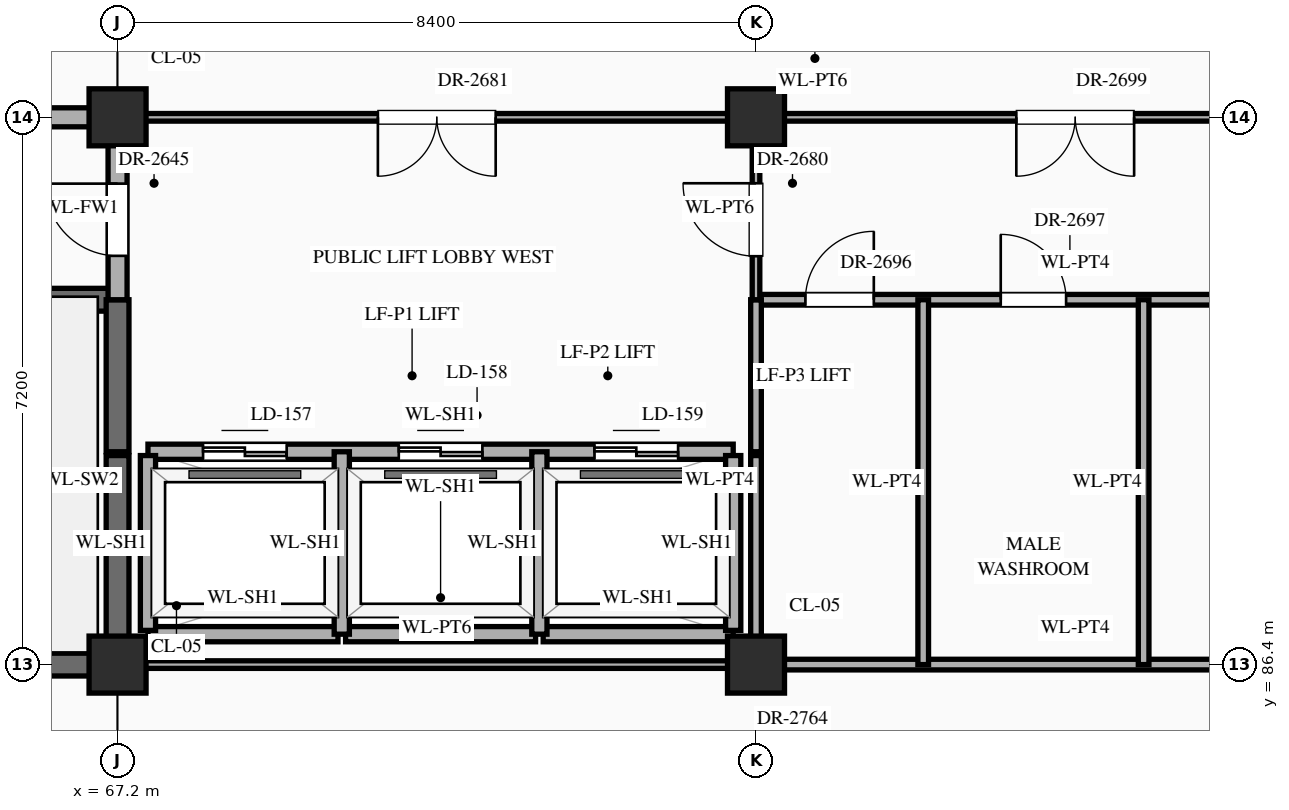
"""IFC4 building model, lengths in metres.
Left out: names, types, materials, properties, quantities, classifications, styles, units other than length and angle.
Written with IfcOpenShell. Run it as: python <this file> out.ifc"""

import sys

from ifc_helpers import new_model, si_unit, direction, frame, frame_2d, origin, origin_2d, place, context, subcontext, project, spatial, rectangle, extrude, element, fill, save


model = new_model("IFC4")
c1 = context("Model", 3, precision=1e-05, world=origin(), true_north=direction((0.0, 1.0)))
c2 = subcontext(c1, "Body", "Model", "MODEL_VIEW")
j1 = project(units=[si_unit("LENGTHUNIT", "METRE"), si_unit("PLANEANGLEUNIT", "RADIAN")], contexts=[c1])
p1 = place(None, origin())
s1 = spatial("IfcSite", under=j1, at=p1, CompositionType="ELEMENT")
p2 = place(p1, origin())
s2 = spatial("IfcBuilding", under=s1, at=p2, CompositionType="ELEMENT")
p3 = place(p2, frame((0.0, 0.0, 39.3)))
s3 = spatial("IfcBuildingStorey", under=s2, at=p3, CompositionType="ELEMENT", Elevation=39.3)
for number, where, z_axis, x_axis in (
    (1, (67.2, 86.4, 0.0), (0.0, 0.0, 1.0), (1.0, 0.0, 0.0)),
    (2, (67.2, 93.6, 0.0), (0.0, 0.0, 1.0), (1.0, 0.0, 0.0)),
    (3, (75.6, 86.4, 0.0), (0.0, 0.0, 1.0), (1.0, 0.0, 0.0)),
    (4, (75.6, 93.6, 0.0), (0.0, 0.0, 1.0), (1.0, 0.0, 0.0)),
):
    element("IfcColumn", number, at=place(p3, frame(where, z_axis=z_axis, x_axis=x_axis)), inside=s3, PredefinedType="COLUMN", context=c2, shape_type="SweptSolid", body=[
        extrude(rectangle(XDim=0.75, YDim=0.75, at=origin_2d()), origin(), (0.0, 0.0, 1.0), 4.2),
    ])
p4 = place(p3, frame((58.8, 86.4, 0.0), z_axis=(0.0, 0.0, 1.0), x_axis=(1.0, 0.0, 0.0)))
e5 = element("IfcWall", 5, at=p4, inside=s3, PredefinedType="SHEAR", context=c2, shape_type="SweptSolid", body=[
    extrude(rectangle(XDim=8.4, YDim=0.3, at=frame_2d((4.2, 0.0))), origin(), (0.0, 0.0, 1.0), 3.95),
])
p5 = place(p3, frame((67.25, 86.4, 0.0), z_axis=(0.0, 0.0, 1.0), x_axis=(1.0, 0.0, 0.0)))
e6 = element("IfcWall", 6, at=p5, inside=s3, PredefinedType="STANDARD", context=c2, shape_type="SweptSolid", body=[
    extrude(rectangle(XDim=8.3, YDim=0.1, at=frame_2d((4.15, 0.0))), origin(), (0.0, 0.0, 1.0), 3.1),
])
p6 = place(p3, frame((75.6, 86.4, 0.0), z_axis=(0.0, 0.0, 1.0), x_axis=(1.0, 0.0, 0.0)))
e7 = element("IfcWall", 7, at=p6, inside=s3, PredefinedType="STANDARD", context=c2, shape_type="SweptSolid", body=[
    extrude(rectangle(XDim=8.4, YDim=0.14, at=frame_2d((4.2, 0.0))), origin(), (0.0, 0.0, 1.0), 3.1),
])
for number, where, z_axis, x_axis in (
    (8, (67.6, 86.8, 0.0), (0.0, 0.0, 1.0), (1.0, 0.0, 0.0)),
    (9, (70.2, 86.8, 0.0), (0.0, 0.0, 1.0), (1.0, 0.0, 0.0)),
    (10, (72.8, 86.8, 0.0), (0.0, 0.0, 1.0), (1.0, 0.0, 0.0)),
):
    element("IfcWall", number, at=place(p3, frame(where, z_axis=z_axis, x_axis=x_axis)), inside=s3, PredefinedType="STANDARD", context=c2, shape_type="SweptSolid", body=[
        extrude(rectangle(XDim=2.5, YDim=0.2, at=frame_2d((1.25, 0.0))), origin(), (0.0, 0.0, 1.0), 3.95),
    ])
p7 = place(p3, frame((67.6, 89.2, 0.0), z_axis=(0.0, 0.0, 1.0), x_axis=(1.0, 0.0, 0.0)))
e11 = element("IfcWall", 11, at=p7, inside=s3, PredefinedType="STANDARD", context=c2, shape_type="SweptSolid", body=[
    extrude(rectangle(XDim=7.7, YDim=0.2, at=frame_2d((3.85, 0.0))), origin(), (0.0, 0.0, 1.0), 3.95),
])
p8 = place(p7, frame((0.725, 0.0, 0.0)))
e12 = element("IfcOpeningElement", 12, at=p8, cuts=e11, PredefinedType="OPENING", context=c2, shape_type="SweptSolid", body=[
    extrude(rectangle(XDim=1.1, YDim=2.15, at=frame_2d((0.55, 1.075))), frame((0.0, 0.112, 0.0), z_axis=(0.0, -1.0, 0.0), x_axis=(1.0, 0.0, 0.0)), (0.0, 0.0, 1.0), 0.224),
])
p9 = place(p7, frame((3.3, 0.0, 0.0)))
e13 = element("IfcOpeningElement", 13, at=p9, cuts=e11, PredefinedType="OPENING", context=c2, shape_type="SweptSolid", body=[
    extrude(rectangle(XDim=1.1, YDim=2.15, at=frame_2d((0.55, 1.075))), frame((0.0, 0.112, 0.0), z_axis=(0.0, -1.0, 0.0), x_axis=(1.0, 0.0, 0.0)), (0.0, 0.0, 1.0), 0.224),
])
p10 = place(p7, frame((5.875, 0.0, 0.0)))
e14 = element("IfcOpeningElement", 14, at=p10, cuts=e11, PredefinedType="OPENING", context=c2, shape_type="SweptSolid", body=[
    extrude(rectangle(XDim=1.1, YDim=2.15, at=frame_2d((0.55, 1.075))), frame((0.0, 0.112, 0.0), z_axis=(0.0, -1.0, 0.0), x_axis=(1.0, 0.0, 0.0)), (0.0, 0.0, 1.0), 0.224),
])
p11 = place(p3, frame((58.8, 91.2, 0.0), z_axis=(0.0, 0.0, 1.0), x_axis=(1.0, 0.0, 0.0)))
e15 = element("IfcWall", 15, at=p11, inside=s3, PredefinedType="SHEAR", context=c2, shape_type="SweptSolid", body=[
    extrude(rectangle(XDim=8.4, YDim=0.3, at=frame_2d((4.2, 0.0))), origin(), (0.0, 0.0, 1.0), 3.95),
])
p12 = place(p11, frame((0.65, 0.0, 0.0)))
e16 = element("IfcOpeningElement", 16, at=p12, cuts=e15, PredefinedType="OPENING", context=c2, shape_type="SweptSolid", body=[
    extrude(rectangle(XDim=1.1, YDim=2.2, at=frame_2d((0.55, 1.1))), frame((0.0, 0.162, 0.0), z_axis=(0.0, -1.0, 0.0), x_axis=(1.0, 0.0, 0.0)), (0.0, 0.0, 1.0), 0.324),
])
p13 = place(p3, frame((75.6, 91.2, 0.0), z_axis=(0.0, 0.0, 1.0), x_axis=(1.0, 0.0, 0.0)))
e17 = element("IfcWall", 17, at=p13, inside=s3, PredefinedType="STANDARD", context=c2, shape_type="SweptSolid", body=[
    extrude(rectangle(XDim=8.4, YDim=0.14, at=frame_2d((4.2, 0.0))), origin(), (0.0, 0.0, 1.0), 3.95),
])
p14 = place(p13, frame((0.65, 0.0, 0.0)))
e18 = element("IfcOpeningElement", 18, at=p14, cuts=e17, PredefinedType="OPENING", context=c2, shape_type="SweptSolid", body=[
    extrude(rectangle(XDim=0.9, YDim=2.15, at=frame_2d((0.45, 1.075))), frame((0.0, 0.082, 0.0), z_axis=(0.0, -1.0, 0.0), x_axis=(1.0, 0.0, 0.0)), (0.0, 0.0, 1.0), 0.164),
])
p15 = place(p13, frame((3.22, 0.0, 0.0)))
e19 = element("IfcOpeningElement", 19, at=p15, cuts=e17, PredefinedType="OPENING", context=c2, shape_type="SweptSolid", body=[
    extrude(rectangle(XDim=0.86, YDim=2.1, at=frame_2d((0.43, 1.05))), frame((0.0, 0.082, 0.0), z_axis=(0.0, -1.0, 0.0), x_axis=(1.0, 0.0, 0.0)), (0.0, 0.0, 1.0), 0.164),
])
p16 = place(p13, frame((6.32, 0.0, 0.0)))
e20 = element("IfcOpeningElement", 20, at=p16, cuts=e17, PredefinedType="OPENING", context=c2, shape_type="SweptSolid", body=[
    extrude(rectangle(XDim=0.86, YDim=2.1, at=frame_2d((0.43, 1.05))), frame((0.0, 0.082, 0.0), z_axis=(0.0, -1.0, 0.0), x_axis=(1.0, 0.0, 0.0)), (0.0, 0.0, 1.0), 0.164),
])
p17 = place(p3, frame((58.8, 93.6, 0.0), z_axis=(0.0, 0.0, 1.0), x_axis=(1.0, 0.0, 0.0)))
e21 = element("IfcWall", 21, at=p17, inside=s3, PredefinedType="STANDARD", context=c2, shape_type="SweptSolid", body=[
    extrude(rectangle(XDim=8.4, YDim=0.25, at=frame_2d((4.2, 0.0))), origin(), (0.0, 0.0, 1.0), 3.1),
])
p18 = place(p17, frame((3.2, 0.0, 0.0)))
e22 = element("IfcOpeningElement", 22, at=p18, cuts=e21, PredefinedType="OPENING", context=c2, shape_type="SweptSolid", body=[
    extrude(rectangle(XDim=2.0, YDim=2.4, at=frame_2d((1.0, 1.2))), frame((0.0, 0.137, 0.0), z_axis=(0.0, -1.0, 0.0), x_axis=(1.0, 0.0, 0.0)), (0.0, 0.0, 1.0), 0.274),
])
p19 = place(p3, frame((67.2, 93.6, 0.0), z_axis=(0.0, 0.0, 1.0), x_axis=(1.0, 0.0, 0.0)))
e23 = element("IfcWall", 23, at=p19, inside=s3, PredefinedType="STANDARD", context=c2, shape_type="SweptSolid", body=[
    extrude(rectangle(XDim=33.6, YDim=0.1, at=frame_2d((16.8, 0.0))), origin(), (0.0, 0.0, 1.0), 3.1),
])
p20 = place(p19, frame((3.425, 0.0, 0.0)))
e24 = element("IfcOpeningElement", 24, at=p20, cuts=e23, PredefinedType="OPENING", context=c2, shape_type="SweptSolid", body=[
    extrude(rectangle(XDim=1.55, YDim=2.35, at=frame_2d((0.775, 1.175))), frame((0.0, 0.062, 0.0), z_axis=(0.0, -1.0, 0.0), x_axis=(1.0, 0.0, 0.0)), (0.0, 0.0, 1.0), 0.124),
])
p21 = place(p19, frame((28.55, 0.0, 0.0)))
e25 = element("IfcOpeningElement", 25, at=p21, cuts=e23, PredefinedType="OPENING", context=c2, shape_type="SweptSolid", body=[
    extrude(rectangle(XDim=1.7, YDim=2.45, at=frame_2d((0.85, 1.225))), frame((0.0, 0.062, 0.0), z_axis=(0.0, -1.0, 0.0), x_axis=(1.0, 0.0, 0.0)), (0.0, 0.0, 1.0), 0.124),
])
p22 = place(p19, frame((11.825, 0.0, 0.0)))
e26 = element("IfcOpeningElement", 26, at=p22, cuts=e23, PredefinedType="OPENING", context=c2, shape_type="SweptSolid", body=[
    extrude(rectangle(XDim=1.55, YDim=2.35, at=frame_2d((0.775, 1.175))), frame((0.0, 0.062, 0.0), z_axis=(0.0, -1.0, 0.0), x_axis=(1.0, 0.0, 0.0)), (0.0, 0.0, 1.0), 0.124),
])
p23 = place(p19, frame((17.708, 0.0, 0.0)))
e27 = element("IfcOpeningElement", 27, at=p23, cuts=e23, PredefinedType="OPENING", context=c2, shape_type="SweptSolid", body=[
    extrude(rectangle(XDim=1.28, YDim=2.35, at=frame_2d((0.64, 1.175))), frame((0.0, 0.062, 0.0), z_axis=(0.0, -1.0, 0.0), x_axis=(1.0, 0.0, 0.0)), (0.0, 0.0, 1.0), 0.124),
])
p24 = place(p19, frame((20.53, 0.0, 0.0)))
e28 = element("IfcOpeningElement", 28, at=p24, cuts=e23, PredefinedType="OPENING", context=c2, shape_type="SweptSolid", body=[
    extrude(rectangle(XDim=0.94, YDim=2.3, at=frame_2d((0.47, 1.15))), frame((0.0, 0.062, 0.0), z_axis=(0.0, -1.0, 0.0), x_axis=(1.0, 0.0, 0.0)), (0.0, 0.0, 1.0), 0.124),
])
p25 = place(p19, frame((23.163, 0.0, 0.0)))
e29 = element("IfcOpeningElement", 29, at=p25, cuts=e23, PredefinedType="OPENING", context=c2, shape_type="SweptSolid", body=[
    extrude(rectangle(XDim=0.98, YDim=2.35, at=frame_2d((0.49, 1.175))), frame((0.0, 0.062, 0.0), z_axis=(0.0, -1.0, 0.0), x_axis=(1.0, 0.0, 0.0)), (0.0, 0.0, 1.0), 0.124),
])
p26 = place(p3, frame((67.2, 86.45, 0.0), z_axis=(0.0, 0.0, 1.0), x_axis=(0.0, 1.0, 0.0)))
e30 = element("IfcWall", 30, at=p26, inside=s3, PredefinedType="SHEAR", context=c2, shape_type="SweptSolid", body=[
    extrude(rectangle(XDim=2.7, YDim=0.3, at=frame_2d((1.35, 0.0))), origin(), (0.0, 0.0, 1.0), 3.95),
])
p27 = place(p3, frame((67.2, 89.2, 0.0), z_axis=(0.0, 0.0, 1.0), x_axis=(0.0, 1.0, 0.0)))
e31 = element("IfcWall", 31, at=p27, inside=s3, PredefinedType="SHEAR", context=c2, shape_type="SweptSolid", body=[
    extrude(rectangle(XDim=2.0, YDim=0.3, at=frame_2d((1.0, 0.0))), origin(), (0.0, 0.0, 1.0), 3.95),
])
p28 = place(p3, frame((67.2, 91.2, 0.0), z_axis=(0.0, 0.0, 1.0), x_axis=(0.0, 1.0, 0.0)))
e32 = element("IfcWall", 32, at=p28, inside=s3, PredefinedType="STANDARD", context=c2, shape_type="SweptSolid", body=[
    extrude(rectangle(XDim=2.4, YDim=0.25, at=frame_2d((1.2, 0.0))), origin(), (0.0, 0.0, 1.0), 3.2),
])
p29 = place(p28, frame((0.577, 0.0, 0.0)))
e33 = element("IfcOpeningElement", 33, at=p29, cuts=e32, PredefinedType="OPENING", context=c2, shape_type="SweptSolid", body=[
    extrude(rectangle(XDim=0.95, YDim=2.15, at=frame_2d((0.475, 1.075))), frame((0.0, 0.137, 0.0), z_axis=(0.0, -1.0, 0.0), x_axis=(1.0, 0.0, 0.0)), (0.0, 0.0, 1.0), 0.274),
])
p30 = place(p3, frame((67.6, 86.85, 0.0), z_axis=(0.0, 0.0, 1.0), x_axis=(0.0, 1.0, 0.0)))
e34 = element("IfcWall", 34, at=p30, inside=s3, PredefinedType="STANDARD", context=c2, shape_type="SweptSolid", body=[
    extrude(rectangle(XDim=2.3, YDim=0.2, at=frame_2d((1.15, 0.0))), origin(), (0.0, 0.0, 1.0), 3.95),
])
for number, where, z_axis, x_axis in (
    (35, (70.15, 86.8, 0.0), (0.0, 0.0, 1.0), (0.0, 1.0, 0.0)),
    (36, (72.75, 86.8, 0.0), (0.0, 0.0, 1.0), (0.0, 1.0, 0.0)),
):
    element("IfcWall", number, at=place(p3, frame(where, z_axis=z_axis, x_axis=x_axis)), inside=s3, PredefinedType="STANDARD", context=c2, shape_type="SweptSolid", body=[
        extrude(rectangle(XDim=2.4, YDim=0.2, at=frame_2d((1.2, 0.0))), origin(), (0.0, 0.0, 1.0), 3.95),
    ])
p31 = place(p3, frame((75.3, 86.85, 0.0), z_axis=(0.0, 0.0, 1.0), x_axis=(0.0, 1.0, 0.0)))
e37 = element("IfcWall", 37, at=p31, inside=s3, PredefinedType="STANDARD", context=c2, shape_type="SweptSolid", body=[
    extrude(rectangle(XDim=2.3, YDim=0.2, at=frame_2d((1.15, 0.0))), origin(), (0.0, 0.0, 1.0), 3.95),
])
p32 = place(p3, frame((75.6, 86.45, 0.0), z_axis=(0.0, 0.0, 1.0), x_axis=(0.0, 1.0, 0.0)))
e38 = element("IfcWall", 38, at=p32, inside=s3, PredefinedType="STANDARD", context=c2, shape_type="SweptSolid", body=[
    extrude(rectangle(XDim=2.7, YDim=0.14, at=frame_2d((1.35, 0.0))), origin(), (0.0, 0.0, 1.0), 3.2),
])
p33 = place(p3, frame((75.6, 89.2, 0.0), z_axis=(0.0, 0.0, 1.0), x_axis=(0.0, 1.0, 0.0)))
e39 = element("IfcWall", 39, at=p33, inside=s3, PredefinedType="STANDARD", context=c2, shape_type="SweptSolid", body=[
    extrude(rectangle(XDim=2.0, YDim=0.14, at=frame_2d((1.0, 0.0))), origin(), (0.0, 0.0, 1.0), 3.2),
])
p34 = place(p3, frame((75.6, 91.2, 0.0), z_axis=(0.0, 0.0, 1.0), x_axis=(0.0, 1.0, 0.0)))
e40 = element("IfcWall", 40, at=p34, inside=s3, PredefinedType="STANDARD", context=c2, shape_type="SweptSolid", body=[
    extrude(rectangle(XDim=2.4, YDim=0.1, at=frame_2d((1.2, 0.0))), origin(), (0.0, 0.0, 1.0), 3.2),
])
p35 = place(p34, frame((0.573, 0.0, 0.0)))
e41 = element("IfcOpeningElement", 41, at=p35, cuts=e40, PredefinedType="OPENING", context=c2, shape_type="SweptSolid", body=[
    extrude(rectangle(XDim=0.96, YDim=2.2, at=frame_2d((0.48, 1.1))), frame((0.0, 0.062, 0.0), z_axis=(0.0, -1.0, 0.0), x_axis=(1.0, 0.0, 0.0)), (0.0, 0.0, 1.0), 0.124),
])
for number, where, z_axis, x_axis in (
    (42, (77.8, 86.4, 0.0), (0.0, 0.0, 1.0), (0.0, 1.0, 0.0)),
    (43, (80.7, 86.4, 0.0), (0.0, 0.0, 1.0), (0.0, 1.0, 0.0)),
):
    element("IfcWall", number, at=place(p3, frame(where, z_axis=z_axis, x_axis=x_axis)), inside=s3, PredefinedType="STANDARD", context=c2, shape_type="SweptSolid", body=[
        extrude(rectangle(XDim=4.8, YDim=0.14, at=frame_2d((2.4, 0.0))), origin(), (0.0, 0.0, 1.0), 3.95),
    ])
p36 = place(p8, origin())
e44 = element("IfcDoor", 44, at=p36, inside=s3, OperationType="DOUBLE_DOOR_SLIDING", PredefinedType="DOOR", context=c2, shape_type="SweptSolid", body=[
    extrude(rectangle(XDim=1.1, YDim=2.15, at=frame_2d((0.55, 1.075))), frame((0.0, 0.025, 0.0), z_axis=(0.0, -1.0, 0.0), x_axis=(1.0, 0.0, 0.0)), (0.0, 0.0, 1.0), 0.05),
])
fill(e12, e44)
p37 = place(p9, origin())
e45 = element("IfcDoor", 45, at=p37, inside=s3, OperationType="DOUBLE_DOOR_SLIDING", PredefinedType="DOOR", context=c2, shape_type="SweptSolid", body=[
    extrude(rectangle(XDim=1.1, YDim=2.15, at=frame_2d((0.55, 1.075))), frame((0.0, 0.025, 0.0), z_axis=(0.0, -1.0, 0.0), x_axis=(1.0, 0.0, 0.0)), (0.0, 0.0, 1.0), 0.05),
])
fill(e13, e45)
p38 = place(p10, origin())
e46 = element("IfcDoor", 46, at=p38, inside=s3, OperationType="DOUBLE_DOOR_SLIDING", PredefinedType="DOOR", context=c2, shape_type="SweptSolid", body=[
    extrude(rectangle(XDim=1.1, YDim=2.15, at=frame_2d((0.55, 1.075))), frame((0.0, 0.025, 0.0), z_axis=(0.0, -1.0, 0.0), x_axis=(1.0, 0.0, 0.0)), (0.0, 0.0, 1.0), 0.05),
])
fill(e14, e46)
p39 = place(p29, origin())
e47 = element("IfcDoor", 47, at=p39, inside=s3, OperationType="SINGLE_SWING_RIGHT", PredefinedType="DOOR", context=c2, shape_type="SweptSolid", body=[
    extrude(rectangle(XDim=0.95, YDim=2.15, at=frame_2d((0.475, 1.075))), frame((0.0, 0.025, 0.0), z_axis=(0.0, -1.0, 0.0), x_axis=(1.0, 0.0, 0.0)), (0.0, 0.0, 1.0), 0.05),
])
fill(e33, e47)
p40 = place(p35, origin())
e48 = element("IfcDoor", 48, at=p40, inside=s3, OperationType="SINGLE_SWING_RIGHT", PredefinedType="DOOR", context=c2, shape_type="SweptSolid", body=[
    extrude(rectangle(XDim=0.96, YDim=2.2, at=frame_2d((0.48, 1.1))), frame((0.0, 0.025, 0.0), z_axis=(0.0, -1.0, 0.0), x_axis=(1.0, 0.0, 0.0)), (0.0, 0.0, 1.0), 0.05),
])
fill(e41, e48)
p41 = place(p20, frame((1.55, 0.0, 0.0), z_axis=(0.0, 0.0, 1.0), x_axis=(-1.0, 0.0, 0.0)))
e49 = element("IfcDoor", 49, at=p41, inside=s3, OperationType="DOUBLE_DOOR_SINGLE_SWING", PredefinedType="DOOR", context=c2, shape_type="SweptSolid", body=[
    extrude(rectangle(XDim=1.55, YDim=2.35, at=frame_2d((0.775, 1.175))), frame((0.0, 0.025, 0.0), z_axis=(0.0, -1.0, 0.0), x_axis=(1.0, 0.0, 0.0)), (0.0, 0.0, 1.0), 0.05),
])
fill(e24, e49)
p42 = place(p14, origin())
e50 = element("IfcDoor", 50, at=p42, inside=s3, OperationType="SINGLE_SWING_RIGHT", PredefinedType="DOOR", context=c2, shape_type="SweptSolid", body=[
    extrude(rectangle(XDim=0.9, YDim=2.15, at=frame_2d((0.45, 1.075))), frame((0.0, 0.025, 0.0), z_axis=(0.0, -1.0, 0.0), x_axis=(1.0, 0.0, 0.0)), (0.0, 0.0, 1.0), 0.05),
])
fill(e18, e50)
p43 = place(p15, origin())
e51 = element("IfcDoor", 51, at=p43, inside=s3, OperationType="SINGLE_SWING_LEFT", PredefinedType="DOOR", context=c2, shape_type="SweptSolid", body=[
    extrude(rectangle(XDim=0.86, YDim=2.1, at=frame_2d((0.43, 1.05))), frame((0.0, 0.025, 0.0), z_axis=(0.0, -1.0, 0.0), x_axis=(1.0, 0.0, 0.0)), (0.0, 0.0, 1.0), 0.05),
])
fill(e19, e51)
p44 = place(p22, frame((1.55, 0.0, 0.0), z_axis=(0.0, 0.0, 1.0), x_axis=(-1.0, 0.0, 0.0)))
e52 = element("IfcDoor", 52, at=p44, inside=s3, OperationType="DOUBLE_DOOR_SINGLE_SWING", PredefinedType="DOOR", context=c2, shape_type="SweptSolid", body=[
    extrude(rectangle(XDim=1.55, YDim=2.35, at=frame_2d((0.775, 1.175))), frame((0.0, 0.025, 0.0), z_axis=(0.0, -1.0, 0.0), x_axis=(1.0, 0.0, 0.0)), (0.0, 0.0, 1.0), 0.05),
])
fill(e26, e52)
save(model, sys.argv[1])
